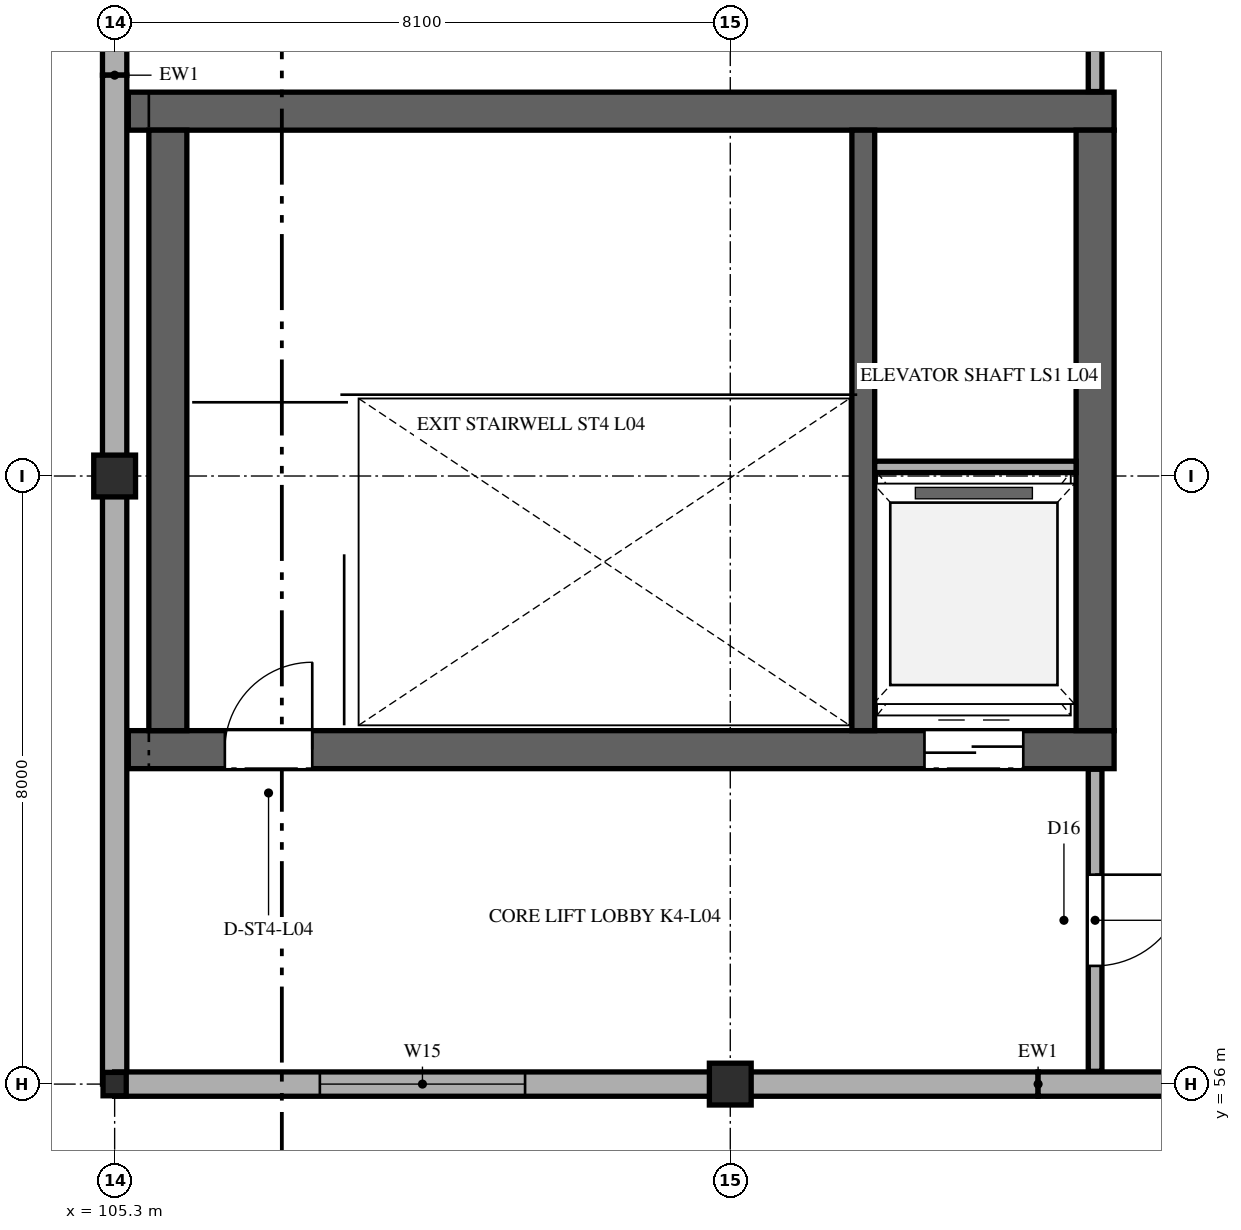
"""IFC4 building model, lengths in metres.
Left out: names, types, materials, properties, quantities, classifications, styles, units other than length and angle.
Written with IfcOpenShell. Run it as: python <this file> out.ifc"""

import sys

from ifc_helpers import new_model, si_unit, direction, frame, frame_2d, origin, origin_2d, place, context, subcontext, project, spatial, rectangle, i_section, extrude, element, fill, save


model = new_model("IFC4")
c1 = context("Model", 3, precision=1e-05, world=origin(), true_north=direction((0.0, 1.0)))
c2 = subcontext(c1, "Body", "Model", "MODEL_VIEW")
j1 = project(units=[si_unit("LENGTHUNIT", "METRE"), si_unit("PLANEANGLEUNIT", "RADIAN")], contexts=[c1])
p1 = place(None, origin())
s1 = spatial("IfcSite", under=j1, at=p1, CompositionType="ELEMENT")
p2 = place(p1, origin())
s2 = spatial("IfcBuilding", under=s1, at=p2, CompositionType="ELEMENT")
p3 = place(p2, frame((0.0, 0.0, 19.8)))
s3 = spatial("IfcBuildingStorey", under=s2, at=p3, CompositionType="ELEMENT", Elevation=19.8)
p4 = place(p3, frame((105.48, 60.4, 0.0), z_axis=(0.0, 0.0, 1.0), x_axis=(1.0, 0.0, 0.0)))
e1 = element("IfcWall", 1, at=p4, inside=s3, PredefinedType="SHEAR", context=c2, shape_type="SweptSolid", body=[
    extrude(rectangle(XDim=12.97, YDim=0.5, at=frame_2d((6.485, 0.0))), origin(), (0.0, 0.0, 1.0), 4.86),
])
p5 = place(p4, frame((1.27, 0.0, 0.0)))
e2 = element("IfcOpeningElement", 2, at=p5, cuts=e1, PredefinedType="OPENING", context=c2, shape_type="SweptSolid", body=[
    extrude(rectangle(XDim=1.15, YDim=2.25, at=frame_2d((0.575, 1.125))), frame((0.0, 0.26, 0.0), z_axis=(0.0, -1.0, 0.0), x_axis=(1.0, 0.0, 0.0)), (0.0, 0.0, 1.0), 0.52),
])
p6 = place(p4, frame((10.475, 0.0, 0.0)))
e3 = element("IfcOpeningElement", 3, at=p6, cuts=e1, PredefinedType="OPENING", context=c2, shape_type="SweptSolid", body=[
    extrude(rectangle(XDim=1.3, YDim=2.3, at=frame_2d((0.65, 1.15))), frame((0.0, 0.26, 0.0), z_axis=(0.0, -1.0, 0.0), x_axis=(1.0, 0.0, 0.0)), (0.0, 0.0, 1.0), 0.52),
])
p7 = place(p3, frame((105.48, 68.8, 0.0), z_axis=(0.0, 0.0, 1.0), x_axis=(1.0, 0.0, 0.0)))
e4 = element("IfcWall", 4, at=p7, inside=s3, PredefinedType="SHEAR", context=c2, shape_type="SweptSolid", body=[
    extrude(rectangle(XDim=12.97, YDim=0.5, at=frame_2d((6.485, 0.0))), origin(), (0.0, 0.0, 1.0), 4.86),
])
for number, where, z_axis, x_axis in (
    (5, (106.0, 60.65, 0.0), (0.0, 0.0, 1.0), (0.0, 1.0, 0.0)),
    (6, (118.2, 60.65, 0.0), (0.0, 0.0, 1.0), (0.0, 1.0, 0.0)),
):
    element("IfcWall", number, at=place(p3, frame(where, z_axis=z_axis, x_axis=x_axis)), inside=s3, PredefinedType="SHEAR", context=c2, shape_type="SweptSolid", body=[
        extrude(rectangle(XDim=7.9, YDim=0.5, at=frame_2d((3.95, 0.0))), origin(), (0.0, 0.0, 1.0), 4.86),
    ])
p8 = place(p3, frame((115.15, 60.65, 0.0), z_axis=(0.0, 0.0, 1.0), x_axis=(0.0, 1.0, 0.0)))
e7 = element("IfcWall", 7, at=p8, inside=s3, PredefinedType="SHEAR", context=c2, shape_type="SweptSolid", body=[
    extrude(rectangle(XDim=7.9, YDim=0.3, at=frame_2d((3.95, 0.0))), origin(), (0.0, 0.0, 1.0), 4.86),
])
p9 = place(p3, frame((105.3, 56.0, 0.0), z_axis=(0.0, 0.0, 1.0), x_axis=(1.0, 0.0, 0.0)))
e8 = element("IfcColumn", 8, at=p9, inside=s3, PredefinedType="COLUMN", context=c2, shape_type="SweptSolid", body=[
    extrude(i_section(OverallWidth=0.305, OverallDepth=0.308, WebThickness=0.01, FlangeThickness=0.015, FilletRadius=0.015, at=origin_2d()), origin(), (0.0, 0.0, 1.0), 4.86),
])
for number, where, z_axis, x_axis in (
    (9, (105.3, 64.0, 0.0), (0.0, 0.0, 1.0), (1.0, 0.0, 0.0)),
    (10, (113.4, 56.0, 0.0), (0.0, 0.0, 1.0), (1.0, 0.0, 0.0)),
):
    element("IfcColumn", number, at=place(p3, frame(where, z_axis=z_axis, x_axis=x_axis)), inside=s3, PredefinedType="COLUMN", context=c2, shape_type="SweptSolid", body=[
        extrude(rectangle(XDim=0.55, YDim=0.55, at=origin_2d()), origin(), (0.0, 0.0, 1.0), 4.86),
    ])
p10 = place(p3, frame((105.3, 82.547, 0.0), z_axis=(0.0, 0.0, 1.0), x_axis=(0.0, -1.0, 0.0)))
e11 = element("IfcWall", 11, at=p10, inside=s3, PredefinedType="SOLIDWALL", context=c2, shape_type="SweptSolid", body=[
    extrude(rectangle(XDim=13.273, YDim=0.32, at=frame_2d((6.637, 0.0))), origin(), (0.0, 0.0, 1.0), 4.86),
])
p11 = place(p10, frame((5.4, 0.0, 0.95)))
e12 = element("IfcOpeningElement", 12, at=p11, cuts=e11, PredefinedType="OPENING", context=c2, shape_type="SweptSolid", body=[
    extrude(rectangle(XDim=2.4, YDim=1.6, at=frame_2d((1.2, 0.8))), frame((0.0, 0.17, 0.0), z_axis=(0.0, -1.0, 0.0), x_axis=(1.0, 0.0, 0.0)), (0.0, 0.0, 1.0), 0.34),
])
p12 = place(p3, frame((105.3, 69.273, 0.0), z_axis=(0.0, 0.0, 1.0), x_axis=(0.0, -1.0, 0.0)))
e13 = element("IfcWall", 13, at=p12, inside=s3, PredefinedType="SOLIDWALL", context=c2, shape_type="SweptSolid", body=[
    extrude(rectangle(XDim=13.273, YDim=0.32, at=frame_2d((6.637, 0.0))), origin(), (0.0, 0.0, 1.0), 4.86),
])
p13 = place(p3, frame((105.3, 56.0, 0.0), z_axis=(0.0, 0.0, 1.0), x_axis=(1.0, 0.0, 0.0)))
e14 = element("IfcWall", 14, at=p13, inside=s3, PredefinedType="SOLIDWALL", context=c2, shape_type="SweptSolid", body=[
    extrude(rectangle(XDim=12.15, YDim=0.32, at=frame_2d((6.075, 0.0))), origin(), (0.0, 0.0, 1.0), 4.86),
])
p14 = place(p13, frame((2.7, 0.0, 0.95)))
e15 = element("IfcOpeningElement", 15, at=p14, cuts=e14, PredefinedType="OPENING", context=c2, shape_type="SweptSolid", body=[
    extrude(rectangle(XDim=2.7, YDim=1.8, at=frame_2d((1.35, 0.9))), frame((0.0, 0.17, 0.0), z_axis=(0.0, -1.0, 0.0), x_axis=(1.0, 0.0, 0.0)), (0.0, 0.0, 1.0), 0.34),
])
p15 = place(p3, frame((117.45, 56.0, 0.0), z_axis=(0.0, 0.0, 1.0), x_axis=(1.0, 0.0, 0.0)))
e16 = element("IfcWall", 16, at=p15, inside=s3, PredefinedType="SOLIDWALL", context=c2, shape_type="SweptSolid", body=[
    extrude(rectangle(XDim=12.15, YDim=0.32, at=frame_2d((6.075, 0.0))), origin(), (0.0, 0.0, 1.0), 4.86),
])
p16 = place(p15, frame((2.7, 0.0, 0.85)))
e17 = element("IfcOpeningElement", 17, at=p16, cuts=e16, PredefinedType="OPENING", context=c2, shape_type="SweptSolid", body=[
    extrude(rectangle(XDim=2.7, YDim=2.1, at=frame_2d((1.35, 1.05))), frame((0.0, 0.17, 0.0), z_axis=(0.0, -1.0, 0.0), x_axis=(1.0, 0.0, 0.0)), (0.0, 0.0, 1.0), 0.34),
])
p17 = place(p3, frame((115.3, 64.12, 0.0), z_axis=(0.0, 0.0, 1.0), x_axis=(1.0, 0.0, 0.0)))
e18 = element("IfcWall", 18, at=p17, inside=s3, PredefinedType="PARTITIONING", context=c2, shape_type="SweptSolid", body=[
    extrude(rectangle(XDim=2.65, YDim=0.15, at=frame_2d((1.325, 0.0))), origin(), (0.0, 0.0, 1.0), 4.86),
])
p18 = place(p3, frame((118.2, 56.168, 0.0), z_axis=(0.0, 0.0, 1.0), x_axis=(0.0, 1.0, 0.0)))
e19 = element("IfcWall", 19, at=p18, inside=s3, PredefinedType="PARTITIONING", context=c2, shape_type="SweptSolid", body=[
    extrude(rectangle(XDim=3.974, YDim=0.18, at=frame_2d((1.987, 0.0))), origin(), (0.0, 0.0, 1.0), 4.86),
])
p19 = place(p18, frame((1.387, 0.0, 0.0)))
e20 = element("IfcOpeningElement", 20, at=p19, cuts=e19, PredefinedType="OPENING", context=c2, shape_type="SweptSolid", body=[
    extrude(rectangle(XDim=1.2, YDim=2.2, at=frame_2d((0.6, 1.1))), frame((0.0, 0.1, 0.0), z_axis=(0.0, -1.0, 0.0), x_axis=(1.0, 0.0, 0.0)), (0.0, 0.0, 1.0), 0.2),
])
p20 = place(p3, frame((118.2, 69.058, 0.0), z_axis=(0.0, 0.0, 1.0), x_axis=(0.0, 1.0, 0.0)))
e21 = element("IfcWall", 21, at=p20, inside=s3, PredefinedType="PARTITIONING", context=c2, shape_type="SweptSolid", body=[
    extrude(rectangle(XDim=26.774, YDim=0.18, at=frame_2d((13.387, 0.0))), origin(), (0.0, 0.0, 1.0), 4.86),
])
p21 = place(p20, frame((12.887, 0.0, 0.0)))
e22 = element("IfcOpeningElement", 22, at=p21, cuts=e21, PredefinedType="OPENING", context=c2, shape_type="SweptSolid", body=[
    extrude(rectangle(XDim=1.0, YDim=2.2, at=frame_2d((0.5, 1.1))), frame((0.0, 0.1, 0.0), z_axis=(0.0, -1.0, 0.0), x_axis=(1.0, 0.0, 0.0)), (0.0, 0.0, 1.0), 0.2),
])
p22 = place(p14, origin())
e23 = element("IfcWindow", 23, at=p22, inside=s3, PartitioningType="TRIPLE_PANEL_VERTICAL", PredefinedType="WINDOW", context=c2, shape_type="SweptSolid", body=[
    extrude(rectangle(XDim=2.7, YDim=1.8, at=frame_2d((1.35, 0.9))), frame((0.0, 0.03, 0.0), z_axis=(0.0, -1.0, 0.0), x_axis=(1.0, 0.0, 0.0)), (0.0, 0.0, 1.0), 0.06),
])
fill(e15, e23)
p23 = place(p5, origin())
e24 = element("IfcDoor", 24, at=p23, inside=s3, OperationType="SINGLE_SWING_RIGHT", PredefinedType="DOOR", context=c2, shape_type="SweptSolid", body=[
    extrude(rectangle(XDim=1.15, YDim=2.25, at=frame_2d((0.575, 1.125))), frame((0.0, 0.025, 0.0), z_axis=(0.0, -1.0, 0.0), x_axis=(1.0, 0.0, 0.0)), (0.0, 0.0, 1.0), 0.05),
])
fill(e2, e24)
p24 = place(p6, frame((1.3, 0.0, 0.0), z_axis=(0.0, 0.0, 1.0), x_axis=(-1.0, 0.0, 0.0)))
e25 = element("IfcDoor", 25, at=p24, inside=s3, OperationType="DOUBLE_DOOR_SLIDING", PredefinedType="DOOR", context=c2, shape_type="SweptSolid", body=[
    extrude(rectangle(XDim=1.3, YDim=2.3, at=frame_2d((0.65, 1.15))), frame((0.0, 0.025, 0.0), z_axis=(0.0, -1.0, 0.0), x_axis=(1.0, 0.0, 0.0)), (0.0, 0.0, 1.0), 0.05),
])
fill(e3, e25)
p25 = place(p19, frame((1.2, 0.0, 0.0), z_axis=(0.0, 0.0, 1.0), x_axis=(-1.0, 0.0, 0.0)))
e26 = element("IfcDoor", 26, at=p25, inside=s3, OperationType="SINGLE_SWING_RIGHT", PredefinedType="DOOR", context=c2, shape_type="SweptSolid", body=[
    extrude(rectangle(XDim=1.2, YDim=2.2, at=frame_2d((0.6, 1.1))), frame((0.0, 0.025, 0.0), z_axis=(0.0, -1.0, 0.0), x_axis=(1.0, 0.0, 0.0)), (0.0, 0.0, 1.0), 0.05),
])
fill(e20, e26)
save(model, sys.argv[1])
